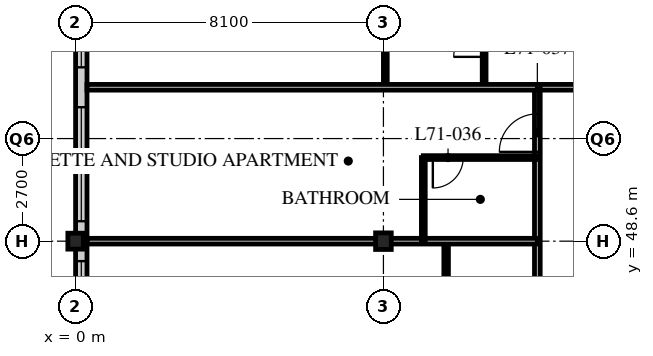
"""IFC4 building model, lengths in metres.
Left out: names, types, materials, properties, quantities, classifications, styles, units other than length and angle.
Written with IfcOpenShell. Run it as: python <this file> out.ifc"""

import sys

from ifc_helpers import new_model, si_unit, direction, frame, frame_2d, origin, origin_2d, place, context, subcontext, project, spatial, rectangle, i_section, extrude, element, fill, save


model = new_model("IFC4")
c1 = context("Model", 3, precision=1e-05, world=origin(), true_north=direction((0.0, 1.0)))
c2 = subcontext(c1, "Body", "Model", "MODEL_VIEW")
j1 = project(units=[si_unit("LENGTHUNIT", "METRE"), si_unit("PLANEANGLEUNIT", "RADIAN")], contexts=[c1])
p1 = place(None, origin())
s1 = spatial("IfcSite", under=j1, at=p1, CompositionType="ELEMENT")
p2 = place(p1, origin())
s2 = spatial("IfcBuilding", under=s1, at=p2, CompositionType="ELEMENT")
p3 = place(p2, frame((0.0, 0.0, 277.5)))
s3 = spatial("IfcBuildingStorey", under=s2, at=p3, CompositionType="ELEMENT", Elevation=277.5)
p4 = place(p3, frame((0.0, 48.6, 0.0), z_axis=(0.0, 0.0, 1.0), x_axis=(1.0, 0.0, 0.0)))
e1 = element("IfcColumn", 1, at=p4, inside=s3, PredefinedType="COLUMN", context=c2, shape_type="SweptSolid", body=[
    extrude(i_section(OverallWidth=0.407, OverallDepth=0.419, WebThickness=0.031, FlangeThickness=0.049, FilletRadius=0.015, at=origin_2d()), origin(), (0.0, 0.0, 1.0), 3.9),
])
p5 = place(p3, frame((8.1, 48.6, 0.0), z_axis=(0.0, 0.0, 1.0), x_axis=(1.0, 0.0, 0.0)))
e2 = element("IfcColumn", 2, at=p5, inside=s3, PredefinedType="COLUMN", context=c2, shape_type="SweptSolid", body=[
    extrude(i_section(OverallWidth=0.412, OverallDepth=0.437, WebThickness=0.036, FlangeThickness=0.058, FilletRadius=0.015, at=origin_2d()), origin(), (0.0, 0.0, 1.0), 3.9),
])
p6 = place(p3, frame((0.15, 56.4, 0.0), z_axis=(0.0, 0.0, 1.0), x_axis=(0.0, -1.0, 0.0)))
e3 = element("IfcWall", 3, at=p6, inside=s3, PredefinedType="SOLIDWALL", context=c2, shape_type="SweptSolid", body=[
    extrude(rectangle(XDim=32.1, YDim=0.3, at=frame_2d((16.05, 0.0))), origin(), (0.0, 0.0, 1.0), 3.69),
])
p7 = place(p6, frame((0.225, 0.0, 0.6)))
e4 = element("IfcOpeningElement", 4, at=p7, cuts=e3, PredefinedType="OPENING", context=c2, shape_type="SweptSolid", body=[
    extrude(rectangle(XDim=3.0, YDim=2.4, at=frame_2d((1.5, 1.2))), frame((0.0, 0.16, 0.0), z_axis=(0.0, -1.0, 0.0), x_axis=(1.0, 0.0, 0.0)), (0.0, 0.0, 1.0), 0.32),
])
p8 = place(p6, frame((4.275, 0.0, 0.6)))
e5 = element("IfcOpeningElement", 5, at=p8, cuts=e3, PredefinedType="OPENING", context=c2, shape_type="SweptSolid", body=[
    extrude(rectangle(XDim=3.0, YDim=2.4, at=frame_2d((1.5, 1.2))), frame((0.0, 0.16, 0.0), z_axis=(0.0, -1.0, 0.0), x_axis=(1.0, 0.0, 0.0)), (0.0, 0.0, 1.0), 0.32),
])
p9 = place(p6, frame((8.325, 0.0, 0.6)))
e6 = element("IfcOpeningElement", 6, at=p9, cuts=e3, PredefinedType="OPENING", context=c2, shape_type="SweptSolid", body=[
    extrude(rectangle(XDim=3.0, YDim=2.4, at=frame_2d((1.5, 1.2))), frame((0.0, 0.16, 0.0), z_axis=(0.0, -1.0, 0.0), x_axis=(1.0, 0.0, 0.0)), (0.0, 0.0, 1.0), 0.32),
])
p10 = place(p6, frame((12.375, 0.0, 0.6)))
e7 = element("IfcOpeningElement", 7, at=p10, cuts=e3, PredefinedType="OPENING", context=c2, shape_type="SweptSolid", body=[
    extrude(rectangle(XDim=3.0, YDim=2.4, at=frame_2d((1.5, 1.2))), frame((0.0, 0.16, 0.0), z_axis=(0.0, -1.0, 0.0), x_axis=(1.0, 0.0, 0.0)), (0.0, 0.0, 1.0), 0.32),
])
p11 = place(p6, frame((16.425, 0.0, 0.6)))
e8 = element("IfcOpeningElement", 8, at=p11, cuts=e3, PredefinedType="OPENING", context=c2, shape_type="SweptSolid", body=[
    extrude(rectangle(XDim=3.0, YDim=2.4, at=frame_2d((1.5, 1.2))), frame((0.0, 0.16, 0.0), z_axis=(0.0, -1.0, 0.0), x_axis=(1.0, 0.0, 0.0)), (0.0, 0.0, 1.0), 0.32),
])
p12 = place(p6, frame((20.475, 0.0, 0.6)))
e9 = element("IfcOpeningElement", 9, at=p12, cuts=e3, PredefinedType="OPENING", context=c2, shape_type="SweptSolid", body=[
    extrude(rectangle(XDim=3.0, YDim=2.4, at=frame_2d((1.5, 1.2))), frame((0.0, 0.16, 0.0), z_axis=(0.0, -1.0, 0.0), x_axis=(1.0, 0.0, 0.0)), (0.0, 0.0, 1.0), 0.32),
])
p13 = place(p6, frame((24.525, 0.0, 0.6)))
e10 = element("IfcOpeningElement", 10, at=p13, cuts=e3, PredefinedType="OPENING", context=c2, shape_type="SweptSolid", body=[
    extrude(rectangle(XDim=3.0, YDim=2.4, at=frame_2d((1.5, 1.2))), frame((0.0, 0.16, 0.0), z_axis=(0.0, -1.0, 0.0), x_axis=(1.0, 0.0, 0.0)), (0.0, 0.0, 1.0), 0.32),
])
p14 = place(p6, frame((28.575, 0.0, 0.6)))
e11 = element("IfcOpeningElement", 11, at=p14, cuts=e3, PredefinedType="OPENING", context=c2, shape_type="SweptSolid", body=[
    extrude(rectangle(XDim=3.0, YDim=2.4, at=frame_2d((1.5, 1.2))), frame((0.0, 0.16, 0.0), z_axis=(0.0, -1.0, 0.0), x_axis=(1.0, 0.0, 0.0)), (0.0, 0.0, 1.0), 0.32),
])
p15 = place(p3, frame((12.15, 52.65, 0.0), z_axis=(0.0, 0.0, 1.0), x_axis=(1.0, 0.0, 0.0)))
e12 = element("IfcWall", 12, at=p15, inside=s3, PredefinedType="PARTITIONING", context=c2, shape_type="SweptSolid", body=[
    extrude(rectangle(XDim=24.3, YDim=0.15, at=frame_2d((12.15, 0.0))), origin(), (0.0, 0.0, 1.0), 3.69),
])
p16 = place(p15, frame((6.4, 0.0, 0.0)))
e13 = element("IfcOpeningElement", 13, at=p16, cuts=e12, PredefinedType="OPENING", context=c2, shape_type="SweptSolid", body=[
    extrude(rectangle(XDim=1.0, YDim=2.1, at=frame_2d((0.5, 1.05))), frame((0.0, 0.085, 0.0), z_axis=(0.0, -1.0, 0.0), x_axis=(1.0, 0.0, 0.0)), (0.0, 0.0, 1.0), 0.17),
])
p17 = place(p15, frame((8.5, 0.0, 0.0)))
e14 = element("IfcOpeningElement", 14, at=p17, cuts=e12, PredefinedType="OPENING", context=c2, shape_type="SweptSolid", body=[
    extrude(rectangle(XDim=1.0, YDim=2.1, at=frame_2d((0.5, 1.05))), frame((0.0, 0.085, 0.0), z_axis=(0.0, -1.0, 0.0), x_axis=(1.0, 0.0, 0.0)), (0.0, 0.0, 1.0), 0.17),
])
p18 = place(p15, frame((16.6, 0.0, 0.0)))
e15 = element("IfcOpeningElement", 15, at=p18, cuts=e12, PredefinedType="OPENING", context=c2, shape_type="SweptSolid", body=[
    extrude(rectangle(XDim=1.0, YDim=2.1, at=frame_2d((0.5, 1.05))), frame((0.0, 0.085, 0.0), z_axis=(0.0, -1.0, 0.0), x_axis=(1.0, 0.0, 0.0)), (0.0, 0.0, 1.0), 0.17),
])
p19 = place(p15, frame((1.525, 0.0, 0.0)))
e16 = element("IfcOpeningElement", 16, at=p19, cuts=e12, PredefinedType="OPENING", context=c2, shape_type="SweptSolid", body=[
    extrude(rectangle(XDim=1.0, YDim=2.1, at=frame_2d((0.5, 1.05))), frame((0.0, 0.085, 0.0), z_axis=(0.0, -1.0, 0.0), x_axis=(1.0, 0.0, 0.0)), (0.0, 0.0, 1.0), 0.17),
])
p20 = place(p3, frame((12.15, 22.5, 0.0), z_axis=(0.0, 0.0, 1.0), x_axis=(0.0, 1.0, 0.0)))
e17 = element("IfcWall", 17, at=p20, inside=s3, PredefinedType="PARTITIONING", context=c2, shape_type="SweptSolid", body=[
    extrude(rectangle(XDim=30.15, YDim=0.15, at=frame_2d((15.075, 0.0))), origin(), (0.0, 0.0, 1.0), 3.69),
])
p21 = place(p20, frame((0.4, 0.0, 0.0)))
e18 = element("IfcOpeningElement", 18, at=p21, cuts=e17, PredefinedType="OPENING", context=c2, shape_type="SweptSolid", body=[
    extrude(rectangle(XDim=1.0, YDim=2.1, at=frame_2d((0.5, 1.05))), frame((0.0, 0.085, 0.0), z_axis=(0.0, -1.0, 0.0), x_axis=(1.0, 0.0, 0.0)), (0.0, 0.0, 1.0), 0.17),
])
p22 = place(p20, frame((18.4, 0.0, 0.0)))
e19 = element("IfcOpeningElement", 19, at=p22, cuts=e17, PredefinedType="OPENING", context=c2, shape_type="SweptSolid", body=[
    extrude(rectangle(XDim=1.0, YDim=2.1, at=frame_2d((0.5, 1.05))), frame((0.0, 0.085, 0.0), z_axis=(0.0, -1.0, 0.0), x_axis=(1.0, 0.0, 0.0)), (0.0, 0.0, 1.0), 0.17),
])
p23 = place(p20, frame((28.45, 0.0, 0.0)))
e20 = element("IfcOpeningElement", 20, at=p23, cuts=e17, PredefinedType="OPENING", context=c2, shape_type="SweptSolid", body=[
    extrude(rectangle(XDim=1.0, YDim=2.1, at=frame_2d((0.5, 1.05))), frame((0.0, 0.085, 0.0), z_axis=(0.0, -1.0, 0.0), x_axis=(1.0, 0.0, 0.0)), (0.0, 0.0, 1.0), 0.17),
])
p24 = place(p3, frame((9.75, 22.5, 0.0), z_axis=(0.0, 0.0, 1.0), x_axis=(0.0, 1.0, 0.0)))
e21 = element("IfcWall", 21, at=p24, inside=s3, PredefinedType="PARTITIONING", context=c2, shape_type="SweptSolid", body=[
    extrude(rectangle(XDim=26.1, YDim=0.12, at=frame_2d((13.05, 0.0))), origin(), (0.0, 0.0, 1.0), 3.69),
])
p25 = place(p24, frame((0.975, 0.0, 0.0)))
e22 = element("IfcOpeningElement", 22, at=p25, cuts=e21, PredefinedType="OPENING", context=c2, shape_type="SweptSolid", body=[
    extrude(rectangle(XDim=0.85, YDim=2.1, at=frame_2d((0.425, 1.05))), frame((0.0, 0.07, 0.0), z_axis=(0.0, -1.0, 0.0), x_axis=(1.0, 0.0, 0.0)), (0.0, 0.0, 1.0), 0.14),
])
p26 = place(p24, frame((10.225, 0.0, 0.0)))
e23 = element("IfcOpeningElement", 23, at=p26, cuts=e21, PredefinedType="OPENING", context=c2, shape_type="SweptSolid", body=[
    extrude(rectangle(XDim=0.85, YDim=2.1, at=frame_2d((0.425, 1.05))), frame((0.0, 0.07, 0.0), z_axis=(0.0, -1.0, 0.0), x_axis=(1.0, 0.0, 0.0)), (0.0, 0.0, 1.0), 0.14),
])
p27 = place(p24, frame((14.275, 0.0, 0.0)))
e24 = element("IfcOpeningElement", 24, at=p27, cuts=e21, PredefinedType="OPENING", context=c2, shape_type="SweptSolid", body=[
    extrude(rectangle(XDim=0.85, YDim=2.1, at=frame_2d((0.425, 1.05))), frame((0.0, 0.07, 0.0), z_axis=(0.0, -1.0, 0.0), x_axis=(1.0, 0.0, 0.0)), (0.0, 0.0, 1.0), 0.14),
])
p28 = place(p24, frame((18.975, 0.0, 0.0)))
e25 = element("IfcOpeningElement", 25, at=p28, cuts=e21, PredefinedType="OPENING", context=c2, shape_type="SweptSolid", body=[
    extrude(rectangle(XDim=0.85, YDim=2.1, at=frame_2d((0.425, 1.05))), frame((0.0, 0.07, 0.0), z_axis=(0.0, -1.0, 0.0), x_axis=(1.0, 0.0, 0.0)), (0.0, 0.0, 1.0), 0.14),
])
p29 = place(p24, frame((22.375, 0.0, 0.0)))
e26 = element("IfcOpeningElement", 26, at=p29, cuts=e21, PredefinedType="OPENING", context=c2, shape_type="SweptSolid", body=[
    extrude(rectangle(XDim=0.85, YDim=2.1, at=frame_2d((0.425, 1.05))), frame((0.0, 0.07, 0.0), z_axis=(0.0, -1.0, 0.0), x_axis=(1.0, 0.0, 0.0)), (0.0, 0.0, 1.0), 0.14),
])
p30 = place(p3, frame((12.15, 48.6, 0.0), z_axis=(0.0, 0.0, 1.0), x_axis=(-1.0, 0.0, 0.0)))
e27 = element("IfcWall", 27, at=p30, inside=s3, PredefinedType="PARTITIONING", context=c2, shape_type="SweptSolid", body=[
    extrude(rectangle(XDim=11.85, YDim=0.15, at=frame_2d((5.925, 0.0))), origin(), (0.0, 0.0, 1.0), 3.078),
])
p31 = place(p3, frame((9.15, 48.6, 0.0), z_axis=(0.0, 0.0, 1.0), x_axis=(0.0, 1.0, 0.0)))
e28 = element("IfcWall", 28, at=p31, inside=s3, PredefinedType="PARTITIONING", context=c2, shape_type="SweptSolid", body=[
    extrude(rectangle(XDim=2.2, YDim=0.1, at=frame_2d((1.1, 0.0))), origin(), (0.0, 0.0, 1.0), 3.69),
])
p32 = place(p3, frame((12.15, 50.8, 0.0), z_axis=(0.0, 0.0, 1.0), x_axis=(-1.0, 0.0, 0.0)))
e29 = element("IfcWall", 29, at=p32, inside=s3, PredefinedType="PARTITIONING", context=c2, shape_type="SweptSolid", body=[
    extrude(rectangle(XDim=3.0, YDim=0.1, at=frame_2d((1.5, 0.0))), origin(), (0.0, 0.0, 1.0), 3.69),
])
p33 = place(p32, frame((1.95, 0.0, 0.0)))
e30 = element("IfcOpeningElement", 30, at=p33, cuts=e29, PredefinedType="OPENING", context=c2, shape_type="SweptSolid", body=[
    extrude(rectangle(XDim=0.8, YDim=2.1, at=frame_2d((0.4, 1.05))), frame((0.0, 0.06, 0.0), z_axis=(0.0, -1.0, 0.0), x_axis=(1.0, 0.0, 0.0)), (0.0, 0.0, 1.0), 0.12),
])
p34 = place(p3, frame((10.75, 52.65, 0.0), z_axis=(0.0, 0.0, 1.0), x_axis=(0.0, 1.0, 0.0)))
e31 = element("IfcWall", 31, at=p34, inside=s3, PredefinedType="PARTITIONING", context=c2, shape_type="SweptSolid", body=[
    extrude(rectangle(XDim=2.4, YDim=0.1, at=frame_2d((1.2, 0.0))), origin(), (0.0, 0.0, 1.0), 3.69),
])
p35 = place(p34, frame((0.8, 0.0, 0.0)))
e32 = element("IfcOpeningElement", 32, at=p35, cuts=e31, PredefinedType="OPENING", context=c2, shape_type="SweptSolid", body=[
    extrude(rectangle(XDim=0.8, YDim=2.1, at=frame_2d((0.4, 1.05))), frame((0.0, 0.06, 0.0), z_axis=(0.0, -1.0, 0.0), x_axis=(1.0, 0.0, 0.0)), (0.0, 0.0, 1.0), 0.12),
])
p36 = place(p3, frame((8.15, 52.65, 0.0), z_axis=(0.0, 0.0, 1.0), x_axis=(0.0, 1.0, 0.0)))
e33 = element("IfcWall", 33, at=p36, inside=s3, PredefinedType="PARTITIONING", context=c2, shape_type="SweptSolid", body=[
    extrude(rectangle(XDim=2.4, YDim=0.1, at=frame_2d((1.2, 0.0))), origin(), (0.0, 0.0, 1.0), 3.078),
])
p37 = place(p3, frame((0.3, 52.65, 0.0), z_axis=(0.0, 0.0, 1.0), x_axis=(1.0, 0.0, 0.0)))
e34 = element("IfcWall", 34, at=p37, inside=s3, PredefinedType="PARTITIONING", context=c2, shape_type="SweptSolid", body=[
    extrude(rectangle(XDim=11.85, YDim=0.15, at=frame_2d((5.925, 0.0))), origin(), (0.0, 0.0, 1.0), 3.69),
])
p38 = place(p7, origin())
e35 = element("IfcWindow", 35, at=p38, inside=s3, PartitioningType="SINGLE_PANEL", PredefinedType="WINDOW", context=c2, shape_type="SweptSolid", body=[
    extrude(rectangle(XDim=3.0, YDim=2.4, at=frame_2d((1.5, 1.2))), frame((0.0, 0.03, 0.0), z_axis=(0.0, -1.0, 0.0), x_axis=(1.0, 0.0, 0.0)), (0.0, 0.0, 1.0), 0.06),
])
fill(e4, e35)
p39 = place(p8, origin())
e36 = element("IfcWindow", 36, at=p39, inside=s3, PartitioningType="SINGLE_PANEL", PredefinedType="WINDOW", context=c2, shape_type="SweptSolid", body=[
    extrude(rectangle(XDim=3.0, YDim=2.4, at=frame_2d((1.5, 1.2))), frame((0.0, 0.03, 0.0), z_axis=(0.0, -1.0, 0.0), x_axis=(1.0, 0.0, 0.0)), (0.0, 0.0, 1.0), 0.06),
])
fill(e5, e36)
p40 = place(p9, origin())
e37 = element("IfcWindow", 37, at=p40, inside=s3, PartitioningType="SINGLE_PANEL", PredefinedType="WINDOW", context=c2, shape_type="SweptSolid", body=[
    extrude(rectangle(XDim=3.0, YDim=2.4, at=frame_2d((1.5, 1.2))), frame((0.0, 0.03, 0.0), z_axis=(0.0, -1.0, 0.0), x_axis=(1.0, 0.0, 0.0)), (0.0, 0.0, 1.0), 0.06),
])
fill(e6, e37)
p41 = place(p33, origin())
e38 = element("IfcDoor", 38, at=p41, inside=s3, OperationType="SINGLE_SWING_RIGHT", PredefinedType="DOOR", context=c2, shape_type="SweptSolid", body=[
    extrude(rectangle(XDim=0.8, YDim=2.1, at=frame_2d((0.4, 1.05))), frame((0.0, 0.025, 0.0), z_axis=(0.0, -1.0, 0.0), x_axis=(1.0, 0.0, 0.0)), (0.0, 0.0, 1.0), 0.05),
])
fill(e30, e38)
p42 = place(p23, origin())
e39 = element("IfcDoor", 39, at=p42, inside=s3, OperationType="SINGLE_SWING_LEFT", PredefinedType="DOOR", context=c2, shape_type="SweptSolid", body=[
    extrude(rectangle(XDim=1.0, YDim=2.1, at=frame_2d((0.5, 1.05))), frame((0.0, 0.025, 0.0), z_axis=(0.0, -1.0, 0.0), x_axis=(1.0, 0.0, 0.0)), (0.0, 0.0, 1.0), 0.05),
])
fill(e20, e39)
p43 = place(p35, origin())
e40 = element("IfcDoor", 40, at=p43, inside=s3, OperationType="SINGLE_SWING_LEFT", PredefinedType="DOOR", context=c2, shape_type="SweptSolid", body=[
    extrude(rectangle(XDim=0.8, YDim=2.1, at=frame_2d((0.4, 1.05))), frame((0.0, 0.025, 0.0), z_axis=(0.0, -1.0, 0.0), x_axis=(1.0, 0.0, 0.0)), (0.0, 0.0, 1.0), 0.05),
])
fill(e32, e40)
save(model, sys.argv[1])
